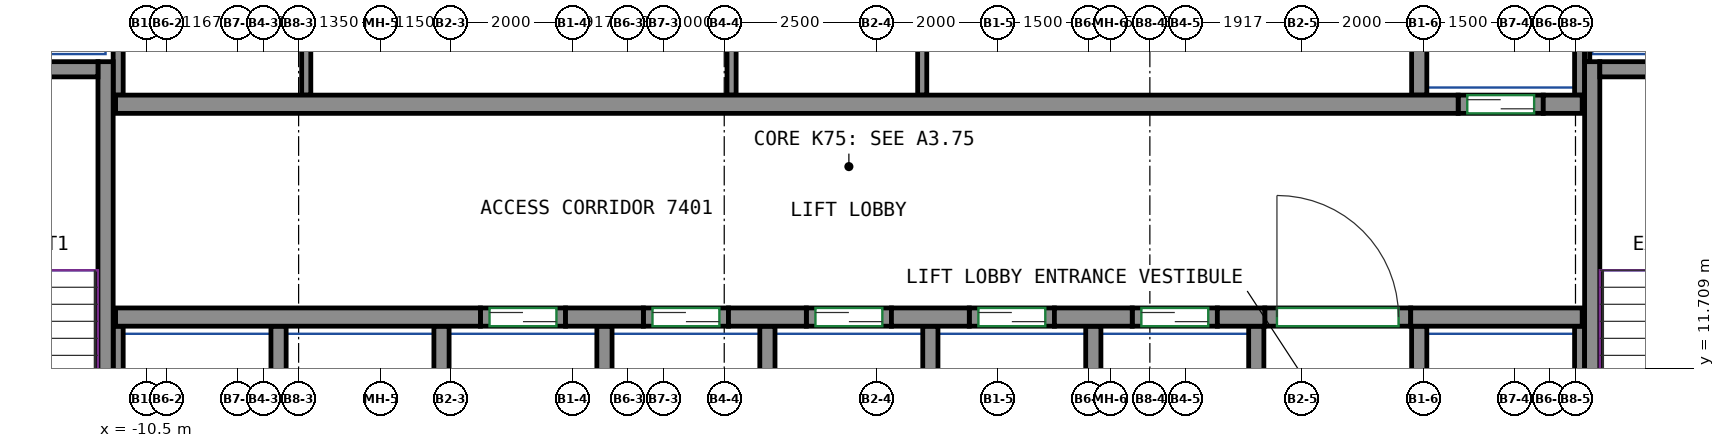
"""IFC4 building model, lengths in metres.
Left out: names, types, materials, properties, quantities, classifications, styles, units other than length and angle.
Written with IfcOpenShell. Run it as: python <this file> out.ifc"""

import sys

from ifc_helpers import new_model, si_unit, direction, frame, frame_2d, origin, place, context, subcontext, project, spatial, rectangle, extrude, source, transform, mapped, element, fill, save


model = new_model("IFC4")
c1 = context("Model", 3, precision=1e-05, world=origin(), true_north=direction((0.0, 1.0)))
c2 = subcontext(c1, "Body", "Model", "MODEL_VIEW")
j1 = project(units=[si_unit("LENGTHUNIT", "METRE"), si_unit("PLANEANGLEUNIT", "RADIAN")], contexts=[c1])
p1 = place(None, origin())
s1 = spatial("IfcSite", under=j1, at=p1, CompositionType="ELEMENT")
p2 = place(p1, origin())
s2 = spatial("IfcBuilding", under=s1, at=p2, CompositionType="ELEMENT")
p3 = place(p2, frame((0.0, 0.0, 298.4)))
s3 = spatial("IfcBuildingStorey", under=s2, at=p3, CompositionType="ELEMENT", Elevation=298.4)
m1 = source(origin(), c2, "Body", "SweptSolid", [
    extrude(rectangle(XDim=7.75, YDim=0.25, at=frame_2d((3.875, 0.0))), origin(), (0.0, 0.0, 1.0), 3.12),
])
p4 = place(p3, frame((-11.175, 9.0, 0.0), z_axis=(0.0, 0.0, 1.0), x_axis=(0.0, 1.0, 0.0)))
e1 = element("IfcWall", 1, at=p4, inside=s3, PredefinedType="SHEAR", context=c2, shape_type="MappedRepresentation", body=[
    mapped(m1, transform((0.0, 0.0, 0.0))),
])
m2 = source(origin(), c2, "Body", "SweptSolid", [
    extrude(rectangle(XDim=3.7, YDim=0.25, at=frame_2d((1.85, 0.0))), origin(), (0.0, 0.0, 1.0), 3.12),
])
p5 = place(p3, frame((-15.0, 16.625, 0.0), z_axis=(0.0, 0.0, 1.0), x_axis=(1.0, 0.0, 0.0)))
e2 = element("IfcWall", 2, at=p5, inside=s3, PredefinedType="SHEAR", context=c2, shape_type="MappedRepresentation", body=[
    mapped(m2, transform((0.0, 0.0, 0.0))),
])
p6 = place(p3, frame((13.275, 9.0, 0.0), z_axis=(0.0, 0.0, 1.0), x_axis=(0.0, 1.0, 0.0)))
e3 = element("IfcWall", 3, at=p6, inside=s3, PredefinedType="SHEAR", context=c2, shape_type="MappedRepresentation", body=[
    mapped(m1, transform((0.0, 0.0, 0.0))),
])
m3 = source(origin(), c2, "Body", "SweptSolid", [
    extrude(rectangle(XDim=3.7, YDim=0.25, at=frame_2d((1.85, 0.0))), origin(), (0.0, 0.0, 1.0), 3.12),
])
p7 = place(p3, frame((13.4, 16.625, 0.0), z_axis=(0.0, 0.0, 1.0), x_axis=(1.0, 0.0, 0.0)))
e4 = element("IfcWall", 4, at=p7, inside=s3, PredefinedType="SHEAR", context=c2, shape_type="MappedRepresentation", body=[
    mapped(m3, transform((0.0, 0.0, 0.0))),
])
m4 = source(origin(), c2, "Body", "SweptSolid", [
    extrude(rectangle(XDim=6.0, YDim=0.3, at=frame_2d((3.0, 0.0))), origin(), (0.0, 0.0, 1.0), 3.12),
])
p8 = place(p3, frame((-11.01, 12.55, 0.0), z_axis=(0.0, 0.0, 1.0), x_axis=(1.0, 0.0, 0.0)))
e5 = element("IfcWall", 5, at=p8, inside=s3, PredefinedType="SHEAR", context=c2, shape_type="MappedRepresentation", body=[
    mapped(m4, transform((0.0, 0.0, 0.0))),
])
m5 = source(origin(), c2, "Body", "SweptSolid", [
    extrude(rectangle(XDim=1.28, YDim=0.3, at=frame_2d((0.64, 0.0))), origin(), (0.0, 0.0, 1.0), 3.12),
])
for number, where, z_axis, x_axis in (
    (6, (-3.61, 12.55, 0.0), (0.0, 0.0, 1.0), (1.0, 0.0, 0.0)),
    (7, (-0.93, 12.55, 0.0), (0.0, 0.0, 1.0), (1.0, 0.0, 0.0)),
    (8, (1.75, 12.55, 0.0), (0.0, 0.0, 1.0), (1.0, 0.0, 0.0)),
    (9, (4.43, 12.55, 0.0), (0.0, 0.0, 1.0), (1.0, 0.0, 0.0)),
):
    element("IfcWall", number, at=place(p3, frame(where, z_axis=z_axis, x_axis=x_axis)), inside=s3, PredefinedType="SHEAR", context=c2, shape_type="MappedRepresentation", body=[
        mapped(m5, transform((0.0, 0.0, 0.0))),
    ])
m6 = source(origin(), c2, "Body", "SweptSolid", [
    extrude(rectangle(XDim=0.78, YDim=0.3, at=frame_2d((0.39, 0.0))), origin(), (0.0, 0.0, 1.0), 3.12),
])
p9 = place(p3, frame((7.11, 12.55, 0.0), z_axis=(0.0, 0.0, 1.0), x_axis=(1.0, 0.0, 0.0)))
e10 = element("IfcWall", 10, at=p9, inside=s3, PredefinedType="SHEAR", context=c2, shape_type="MappedRepresentation", body=[
    mapped(m6, transform((0.0, 0.0, 0.0))),
])
m7 = source(origin(), c2, "Body", "SweptSolid", [
    extrude(rectangle(XDim=2.82, YDim=0.3, at=frame_2d((1.41, 0.0))), origin(), (0.0, 0.0, 1.0), 3.12),
])
p10 = place(p3, frame((10.29, 12.55, 0.0), z_axis=(0.0, 0.0, 1.0), x_axis=(1.0, 0.0, 0.0)))
e11 = element("IfcWall", 11, at=p10, inside=s3, PredefinedType="SHEAR", context=c2, shape_type="MappedRepresentation", body=[
    mapped(m7, transform((0.0, 0.0, 0.0))),
])
m8 = source(origin(), c2, "Body", "SweptSolid", [
    extrude(rectangle(XDim=22.08, YDim=0.3, at=frame_2d((11.04, 0.0))), origin(), (0.0, 0.0, 1.0), 3.12),
])
p11 = place(p3, frame((-11.01, 16.05, 0.0), z_axis=(0.0, 0.0, 1.0), x_axis=(1.0, 0.0, 0.0)))
e12 = element("IfcWall", 12, at=p11, inside=s3, PredefinedType="SHEAR", context=c2, shape_type="MappedRepresentation", body=[
    mapped(m8, transform((0.0, 0.0, 0.0))),
])
m9 = source(origin(), c2, "Body", "SweptSolid", [
    extrude(rectangle(XDim=0.64, YDim=0.3, at=frame_2d((0.32, 0.0))), origin(), (0.0, 0.0, 1.0), 3.12),
])
p12 = place(p3, frame((12.47, 16.05, 0.0), z_axis=(0.0, 0.0, 1.0), x_axis=(1.0, 0.0, 0.0)))
e13 = element("IfcWall", 13, at=p12, inside=s3, PredefinedType="SHEAR", context=c2, shape_type="MappedRepresentation", body=[
    mapped(m9, transform((0.0, 0.0, 0.0))),
])
m10 = source(origin(), c2, "Body", "SweptSolid", [
    extrude(rectangle(XDim=1.4, YDim=0.3, at=frame_2d((0.7, 0.0))), origin(), (0.0, 0.0, 1.0), 3.12),
])
p13 = place(p3, frame((-5.01, 12.55, 0.0), z_axis=(0.0, 0.0, 1.0), x_axis=(1.0, 0.0, 0.0)))
e14 = element("IfcWall", 14, at=p13, inside=s3, PredefinedType="PARTITIONING", context=c2, shape_type="MappedRepresentation", body=[
    mapped(m10, transform((0.0, 0.0, 0.0))),
])
p14 = place(p13, frame((0.15, 0.0, 0.0)))
e15 = element("IfcOpeningElement", 15, at=p14, cuts=e14, PredefinedType="OPENING", context=c2, shape_type="SweptSolid", body=[
    extrude(rectangle(XDim=1.1, YDim=2.1, at=frame_2d((0.55, 1.05))), frame((0.0, 0.16, 0.0), z_axis=(0.0, -1.0, 0.0), x_axis=(1.0, 0.0, 0.0)), (0.0, 0.0, 1.0), 0.32),
])
m11 = source(origin(), c2, "Body", "SweptSolid", [
    extrude(rectangle(XDim=1.4, YDim=0.3, at=frame_2d((0.7, 0.0))), origin(), (0.0, 0.0, 1.0), 3.12),
])
p15 = place(p3, frame((-2.33, 12.55, 0.0), z_axis=(0.0, 0.0, 1.0), x_axis=(1.0, 0.0, 0.0)))
e16 = element("IfcWall", 16, at=p15, inside=s3, PredefinedType="PARTITIONING", context=c2, shape_type="MappedRepresentation", body=[
    mapped(m11, transform((0.0, 0.0, 0.0))),
])
p16 = place(p15, frame((0.15, 0.0, 0.0)))
e17 = element("IfcOpeningElement", 17, at=p16, cuts=e16, PredefinedType="OPENING", context=c2, shape_type="SweptSolid", body=[
    extrude(rectangle(XDim=1.1, YDim=2.1, at=frame_2d((0.55, 1.05))), frame((0.0, 0.16, 0.0), z_axis=(0.0, -1.0, 0.0), x_axis=(1.0, 0.0, 0.0)), (0.0, 0.0, 1.0), 0.32),
])
p17 = place(p3, frame((0.35, 12.55, 0.0), z_axis=(0.0, 0.0, 1.0), x_axis=(1.0, 0.0, 0.0)))
e18 = element("IfcWall", 18, at=p17, inside=s3, PredefinedType="PARTITIONING", context=c2, shape_type="MappedRepresentation", body=[
    mapped(m10, transform((0.0, 0.0, 0.0))),
])
p18 = place(p17, frame((0.15, 0.0, 0.0)))
e19 = element("IfcOpeningElement", 19, at=p18, cuts=e18, PredefinedType="OPENING", context=c2, shape_type="SweptSolid", body=[
    extrude(rectangle(XDim=1.1, YDim=2.1, at=frame_2d((0.55, 1.05))), frame((0.0, 0.16, 0.0), z_axis=(0.0, -1.0, 0.0), x_axis=(1.0, 0.0, 0.0)), (0.0, 0.0, 1.0), 0.32),
])
p19 = place(p3, frame((3.03, 12.55, 0.0), z_axis=(0.0, 0.0, 1.0), x_axis=(1.0, 0.0, 0.0)))
e20 = element("IfcWall", 20, at=p19, inside=s3, PredefinedType="PARTITIONING", context=c2, shape_type="MappedRepresentation", body=[
    mapped(m10, transform((0.0, 0.0, 0.0))),
])
p20 = place(p19, frame((0.15, 0.0, 0.0)))
e21 = element("IfcOpeningElement", 21, at=p20, cuts=e20, PredefinedType="OPENING", context=c2, shape_type="SweptSolid", body=[
    extrude(rectangle(XDim=1.1, YDim=2.1, at=frame_2d((0.55, 1.05))), frame((0.0, 0.16, 0.0), z_axis=(0.0, -1.0, 0.0), x_axis=(1.0, 0.0, 0.0)), (0.0, 0.0, 1.0), 0.32),
])
p21 = place(p3, frame((5.71, 12.55, 0.0), z_axis=(0.0, 0.0, 1.0), x_axis=(1.0, 0.0, 0.0)))
e22 = element("IfcWall", 22, at=p21, inside=s3, PredefinedType="PARTITIONING", context=c2, shape_type="MappedRepresentation", body=[
    mapped(m11, transform((0.0, 0.0, 0.0))),
])
p22 = place(p21, frame((0.15, 0.0, 0.0)))
e23 = element("IfcOpeningElement", 23, at=p22, cuts=e22, PredefinedType="OPENING", context=c2, shape_type="SweptSolid", body=[
    extrude(rectangle(XDim=1.1, YDim=2.1, at=frame_2d((0.55, 1.05))), frame((0.0, 0.16, 0.0), z_axis=(0.0, -1.0, 0.0), x_axis=(1.0, 0.0, 0.0)), (0.0, 0.0, 1.0), 0.32),
])
p23 = place(p3, frame((11.07, 16.05, 0.0), z_axis=(0.0, 0.0, 1.0), x_axis=(1.0, 0.0, 0.0)))
e24 = element("IfcWall", 24, at=p23, inside=s3, PredefinedType="PARTITIONING", context=c2, shape_type="MappedRepresentation", body=[
    mapped(m10, transform((0.0, 0.0, 0.0))),
])
p24 = place(p23, frame((0.15, 0.0, 0.0)))
e25 = element("IfcOpeningElement", 25, at=p24, cuts=e24, PredefinedType="OPENING", context=c2, shape_type="SweptSolid", body=[
    extrude(rectangle(XDim=1.1, YDim=2.1, at=frame_2d((0.55, 1.05))), frame((0.0, 0.16, 0.0), z_axis=(0.0, -1.0, 0.0), x_axis=(1.0, 0.0, 0.0)), (0.0, 0.0, 1.0), 0.32),
])
m12 = source(origin(), c2, "Body", "SweptSolid", [
    extrude(rectangle(XDim=2.4, YDim=0.3, at=frame_2d((1.2, 0.0))), origin(), (0.0, 0.0, 1.0), 3.12),
])
p25 = place(p3, frame((7.89, 12.55, 0.0), z_axis=(0.0, 0.0, 1.0), x_axis=(1.0, 0.0, 0.0)))
e26 = element("IfcWall", 26, at=p25, inside=s3, PredefinedType="PARTITIONING", context=c2, shape_type="MappedRepresentation", body=[
    mapped(m12, transform((0.0, 0.0, 0.0))),
])
p26 = place(p25, frame((0.2, 0.0, 0.0)))
e27 = element("IfcOpeningElement", 27, at=p26, cuts=e26, PredefinedType="OPENING", context=c2, shape_type="SweptSolid", body=[
    extrude(rectangle(XDim=2.0, YDim=2.1, at=frame_2d((1.0, 1.05))), frame((0.0, 0.16, 0.0), z_axis=(0.0, -1.0, 0.0), x_axis=(1.0, 0.0, 0.0)), (0.0, 0.0, 1.0), 0.32),
])
m13 = source(origin(), c2, "Body", "SweptSolid", [
    extrude(rectangle(XDim=3.275, YDim=0.165, at=frame_2d((1.638, 0.0))), origin(), (0.0, 0.0, 1.0), 3.12),
])
p27 = place(p3, frame((13.067, 16.2, 0.0), z_axis=(0.0, 0.0, 1.0), x_axis=(0.0, 1.0, 0.0)))
e28 = element("IfcWall", 28, at=p27, inside=s3, PredefinedType="PARTITIONING", context=c2, shape_type="MappedRepresentation", body=[
    mapped(m13, transform((0.0, 0.0, 0.0))),
])
m14 = source(origin(), c2, "Body", "SweptSolid", [
    extrude(rectangle(XDim=4.8, YDim=0.165, at=frame_2d((2.4, 0.0))), origin(), (0.0, 0.0, 1.0), 3.12),
])
p28 = place(p3, frame((-10.968, 16.2, 0.0), z_axis=(0.0, 0.0, 1.0), x_axis=(0.0, 1.0, 0.0)))
e29 = element("IfcWall", 29, at=p28, inside=s3, PredefinedType="PARTITIONING", context=c2, shape_type="MappedRepresentation", body=[
    mapped(m14, transform((0.0, 0.0, 0.0))),
])
m15 = source(origin(), c2, "Body", "SweptSolid", [
    extrude(rectangle(XDim=3.275, YDim=0.25, at=frame_2d((1.638, 0.0))), origin(), (0.0, 0.0, 1.0), 3.12),
])
p29 = place(p3, frame((10.43, 16.2, 0.0), z_axis=(0.0, 0.0, 1.0), x_axis=(0.0, 1.0, 0.0)))
e30 = element("IfcWall", 30, at=p29, inside=s3, PredefinedType="PARTITIONING", context=c2, shape_type="MappedRepresentation", body=[
    mapped(m15, transform((0.0, 0.0, 0.0))),
])
m16 = source(origin(), c2, "Body", "SweptSolid", [
    extrude(rectangle(XDim=2.725, YDim=0.085, at=frame_2d((1.363, 0.0))), origin(), (0.0, 0.0, 1.0), 3.12),
])
p30 = place(p3, frame((13.192, 16.75, 0.0), z_axis=(0.0, 0.0, 1.0), x_axis=(0.0, 1.0, 0.0)))
e31 = element("IfcWall", 31, at=p30, inside=s3, PredefinedType="PARTITIONING", context=c2, shape_type="MappedRepresentation", body=[
    mapped(m16, transform((0.0, 0.0, 0.0))),
])
m17 = source(origin(), c2, "Body", "SweptSolid", [
    extrude(rectangle(XDim=3.4, YDim=0.25, at=frame_2d((1.7, 0.0))), origin(), (0.0, 0.0, 1.0), 3.12),
])
p31 = place(p3, frame((10.43, 9.0, 0.0), z_axis=(0.0, 0.0, 1.0), x_axis=(0.0, 1.0, 0.0)))
e32 = element("IfcWall", 32, at=p31, inside=s3, PredefinedType="PARTITIONING", context=c2, shape_type="MappedRepresentation", body=[
    mapped(m17, transform((0.0, 0.0, 0.0))),
])
m18 = source(origin(), c2, "Body", "SweptSolid", [
    extrude(rectangle(XDim=3.4, YDim=0.165, at=frame_2d((1.7, 0.0))), origin(), (0.0, 0.0, 1.0), 3.12),
])
p32 = place(p3, frame((13.067, 9.0, 0.0), z_axis=(0.0, 0.0, 1.0), x_axis=(0.0, 1.0, 0.0)))
e33 = element("IfcWall", 33, at=p32, inside=s3, PredefinedType="PARTITIONING", context=c2, shape_type="MappedRepresentation", body=[
    mapped(m18, transform((0.0, 0.0, 0.0))),
])
for number, where, z_axis, x_axis in (
    (34, (2.39, 9.0, 0.0), (0.0, 0.0, 1.0), (0.0, 1.0, 0.0)),
    (35, (5.07, 9.0, 0.0), (0.0, 0.0, 1.0), (0.0, 1.0, 0.0)),
    (36, (7.75, 9.0, 0.0), (0.0, 0.0, 1.0), (0.0, 1.0, 0.0)),
    (37, (-0.29, 9.0, 0.0), (0.0, 0.0, 1.0), (0.0, 1.0, 0.0)),
):
    element("IfcWall", number, at=place(p3, frame(where, z_axis=z_axis, x_axis=x_axis)), inside=s3, PredefinedType="PARTITIONING", context=c2, shape_type="MappedRepresentation", body=[
        mapped(m17, transform((0.0, 0.0, 0.0))),
    ])
p33 = place(p3, frame((-10.968, 9.0, 0.0), z_axis=(0.0, 0.0, 1.0), x_axis=(0.0, 1.0, 0.0)))
e38 = element("IfcWall", 38, at=p33, inside=s3, PredefinedType="PARTITIONING", context=c2, shape_type="MappedRepresentation", body=[
    mapped(m18, transform((0.0, 0.0, 0.0))),
])
for number, where, z_axis, x_axis in (
    (39, (-2.97, 9.0, 0.0), (0.0, 0.0, 1.0), (0.0, 1.0, 0.0)),
    (40, (-5.65, 9.0, 0.0), (0.0, 0.0, 1.0), (0.0, 1.0, 0.0)),
    (41, (-8.33, 9.0, 0.0), (0.0, 0.0, 1.0), (0.0, 1.0, 0.0)),
):
    element("IfcWall", number, at=place(p3, frame(where, z_axis=z_axis, x_axis=x_axis)), inside=s3, PredefinedType="PARTITIONING", context=c2, shape_type="MappedRepresentation", body=[
        mapped(m17, transform((0.0, 0.0, 0.0))),
    ])
m19 = source(origin(), c2, "Body", "SweptSolid", [
    extrude(rectangle(XDim=4.8, YDim=0.15, at=frame_2d((2.4, 0.0))), origin(), (0.0, 0.0, 1.0), 3.12),
])
for number, where, z_axis, x_axis in (
    (42, (-7.875, 16.2, 0.0), (0.0, 0.0, 1.0), (0.0, 1.0, 0.0)),
    (43, (-0.88, 16.2, 0.0), (0.0, 0.0, 1.0), (0.0, 1.0, 0.0)),
    (44, (2.256, 16.2, 0.0), (0.0, 0.0, 1.0), (0.0, 1.0, 0.0)),
):
    element("IfcWall", number, at=place(p3, frame(where, z_axis=z_axis, x_axis=x_axis)), inside=s3, PredefinedType="PARTITIONING", context=c2, shape_type="MappedRepresentation", body=[
        mapped(m19, transform((0.0, 0.0, 0.0))),
    ])
p34 = place(p26, origin())
e45 = element("IfcDoor", 45, at=p34, inside=s3, OperationType="DOUBLE_DOOR_SINGLE_SWING", PredefinedType="DOOR", context=c2, shape_type="SweptSolid", body=[
    extrude(rectangle(XDim=2.0, YDim=2.1, at=frame_2d((1.0, 1.05))), frame((0.0, 0.025, 0.0), z_axis=(0.0, -1.0, 0.0), x_axis=(1.0, 0.0, 0.0)), (0.0, 0.0, 1.0), 0.05),
])
fill(e27, e45)
p35 = place(p14, origin())
e46 = element("IfcDoor", 46, at=p35, inside=s3, OperationType="DOUBLE_DOOR_SLIDING", PredefinedType="DOOR", context=c2, shape_type="SweptSolid", body=[
    extrude(rectangle(XDim=1.1, YDim=2.1, at=frame_2d((0.55, 1.05))), frame((0.0, 0.025, 0.0), z_axis=(0.0, -1.0, 0.0), x_axis=(1.0, 0.0, 0.0)), (0.0, 0.0, 1.0), 0.05),
])
fill(e15, e46)
p36 = place(p16, origin())
e47 = element("IfcDoor", 47, at=p36, inside=s3, OperationType="DOUBLE_DOOR_SLIDING", PredefinedType="DOOR", context=c2, shape_type="SweptSolid", body=[
    extrude(rectangle(XDim=1.1, YDim=2.1, at=frame_2d((0.55, 1.05))), frame((0.0, 0.025, 0.0), z_axis=(0.0, -1.0, 0.0), x_axis=(1.0, 0.0, 0.0)), (0.0, 0.0, 1.0), 0.05),
])
fill(e17, e47)
p37 = place(p18, origin())
e48 = element("IfcDoor", 48, at=p37, inside=s3, OperationType="DOUBLE_DOOR_SLIDING", PredefinedType="DOOR", context=c2, shape_type="SweptSolid", body=[
    extrude(rectangle(XDim=1.1, YDim=2.1, at=frame_2d((0.55, 1.05))), frame((0.0, 0.025, 0.0), z_axis=(0.0, -1.0, 0.0), x_axis=(1.0, 0.0, 0.0)), (0.0, 0.0, 1.0), 0.05),
])
fill(e19, e48)
p38 = place(p20, origin())
e49 = element("IfcDoor", 49, at=p38, inside=s3, OperationType="DOUBLE_DOOR_SLIDING", PredefinedType="DOOR", context=c2, shape_type="SweptSolid", body=[
    extrude(rectangle(XDim=1.1, YDim=2.1, at=frame_2d((0.55, 1.05))), frame((0.0, 0.025, 0.0), z_axis=(0.0, -1.0, 0.0), x_axis=(1.0, 0.0, 0.0)), (0.0, 0.0, 1.0), 0.05),
])
fill(e21, e49)
p39 = place(p22, origin())
e50 = element("IfcDoor", 50, at=p39, inside=s3, OperationType="DOUBLE_DOOR_SLIDING", PredefinedType="DOOR", context=c2, shape_type="SweptSolid", body=[
    extrude(rectangle(XDim=1.1, YDim=2.1, at=frame_2d((0.55, 1.05))), frame((0.0, 0.025, 0.0), z_axis=(0.0, -1.0, 0.0), x_axis=(1.0, 0.0, 0.0)), (0.0, 0.0, 1.0), 0.05),
])
fill(e23, e50)
p40 = place(p24, origin())
e51 = element("IfcDoor", 51, at=p40, inside=s3, OperationType="DOUBLE_DOOR_SLIDING", PredefinedType="DOOR", context=c2, shape_type="SweptSolid", body=[
    extrude(rectangle(XDim=1.1, YDim=2.1, at=frame_2d((0.55, 1.05))), frame((0.0, 0.025, 0.0), z_axis=(0.0, -1.0, 0.0), x_axis=(1.0, 0.0, 0.0)), (0.0, 0.0, 1.0), 0.05),
])
fill(e25, e51)
save(model, sys.argv[1])
